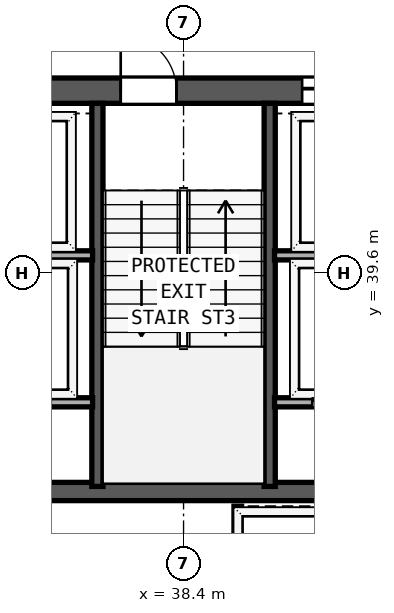
"""IFC4 building model, lengths in metres.
Left out: names, types, materials, properties, quantities, classifications, styles, units other than length and angle.
Written with IfcOpenShell. Run it as: python <this file> out.ifc"""

import sys

from ifc_helpers import new_model, si_unit, direction, frame, frame_2d, origin, place, context, subcontext, project, spatial, rectangle, extrude, element, fill, save


model = new_model("IFC4")
c1 = context("Model", 3, precision=1e-05, world=origin(), true_north=direction((0.0, 1.0)))
c2 = subcontext(c1, "Body", "Model", "MODEL_VIEW")
j1 = project(units=[si_unit("LENGTHUNIT", "METRE"), si_unit("PLANEANGLEUNIT", "RADIAN")], contexts=[c1])
p1 = place(None, origin())
s1 = spatial("IfcSite", under=j1, at=p1, CompositionType="ELEMENT")
p2 = place(p1, origin())
s2 = spatial("IfcBuilding", under=s1, at=p2, CompositionType="ELEMENT")
p3 = place(p2, frame((0.0, 0.0, 301.7)))
s3 = spatial("IfcBuildingStorey", under=s2, at=p3, CompositionType="ELEMENT", Elevation=301.7)
p4 = place(p3, frame((29.75, 43.2, 0.0), z_axis=(0.0, 0.0, 1.0), x_axis=(1.0, 0.0, 0.0)))
e1 = element("IfcWall", 1, at=p4, inside=s3, PredefinedType="SHEAR", context=c2, shape_type="SweptSolid", body=[
    extrude(rectangle(XDim=17.3, YDim=0.5, at=frame_2d((8.65, 0.0))), origin(), (0.0, 0.0, 1.0), 3.72),
])
p5 = place(p4, frame((2.3, 0.0, 0.0)))
e2 = element("IfcOpeningElement", 2, at=p5, cuts=e1, PredefinedType="OPENING", context=c2, shape_type="SweptSolid", body=[
    extrude(rectangle(XDim=1.1, YDim=2.15, at=frame_2d((0.55, 1.075))), frame((0.0, 0.26, 0.0), z_axis=(0.0, -1.0, 0.0), x_axis=(1.0, 0.0, 0.0)), (0.0, 0.0, 1.0), 0.52),
])
p6 = place(p4, frame((7.41, 0.0, 0.0)))
e3 = element("IfcOpeningElement", 3, at=p6, cuts=e1, PredefinedType="OPENING", context=c2, shape_type="SweptSolid", body=[
    extrude(rectangle(XDim=1.1, YDim=2.15, at=frame_2d((0.55, 1.075))), frame((0.0, 0.26, 0.0), z_axis=(0.0, -1.0, 0.0), x_axis=(1.0, 0.0, 0.0)), (0.0, 0.0, 1.0), 0.52),
])
p7 = place(p4, frame((13.5, 0.0, 0.0)))
e4 = element("IfcOpeningElement", 4, at=p7, cuts=e1, PredefinedType="OPENING", context=c2, shape_type="SweptSolid", body=[
    extrude(rectangle(XDim=1.1, YDim=2.15, at=frame_2d((0.55, 1.075))), frame((0.0, 0.26, 0.0), z_axis=(0.0, -1.0, 0.0), x_axis=(1.0, 0.0, 0.0)), (0.0, 0.0, 1.0), 0.52),
])
p8 = place(p4, frame((4.63, 0.0, 0.0)))
e5 = element("IfcOpeningElement", 5, at=p8, cuts=e1, PredefinedType="OPENING", context=c2, shape_type="SweptSolid", body=[
    extrude(rectangle(XDim=1.1, YDim=2.2, at=frame_2d((0.55, 1.1))), frame((0.0, 0.26, 0.0), z_axis=(0.0, -1.0, 0.0), x_axis=(1.0, 0.0, 0.0)), (0.0, 0.0, 1.0), 0.52),
])
p9 = place(p4, frame((10.99, 0.0, 0.0)))
e6 = element("IfcOpeningElement", 6, at=p9, cuts=e1, PredefinedType="OPENING", context=c2, shape_type="SweptSolid", body=[
    extrude(rectangle(XDim=1.1, YDim=2.2, at=frame_2d((0.55, 1.1))), frame((0.0, 0.26, 0.0), z_axis=(0.0, -1.0, 0.0), x_axis=(1.0, 0.0, 0.0)), (0.0, 0.0, 1.0), 0.52),
])
p10 = place(p3, frame((30.25, 35.29, 0.0), z_axis=(0.0, 0.0, 1.0), x_axis=(1.0, 0.0, 0.0)))
e7 = element("IfcWall", 7, at=p10, inside=s3, PredefinedType="SHEAR", context=c2, shape_type="SweptSolid", body=[
    extrude(rectangle(XDim=16.3, YDim=0.36, at=frame_2d((8.15, 0.0))), origin(), (0.0, 0.0, 1.0), 3.72),
])
p11 = place(p10, frame((5.1, 0.0, 0.0), z_axis=(0.0, 0.0, 1.0), x_axis=(-1.0, 0.0, 0.0)))
e8 = element("IfcOpeningElement", 8, at=p11, cuts=e7, PredefinedType="OPENING", context=c2, shape_type="SweptSolid", body=[
    extrude(rectangle(XDim=0.9, YDim=2.1, at=frame_2d((0.45, 1.05))), frame((0.0, 0.19, 0.0), z_axis=(0.0, -1.0, 0.0), x_axis=(1.0, 0.0, 0.0)), (0.0, 0.0, 1.0), 0.38),
])
p12 = place(p10, frame((12.16, 0.0, 0.0), z_axis=(0.0, 0.0, 1.0), x_axis=(-1.0, 0.0, 0.0)))
e9 = element("IfcOpeningElement", 9, at=p12, cuts=e7, PredefinedType="OPENING", context=c2, shape_type="SweptSolid", body=[
    extrude(rectangle(XDim=0.9, YDim=2.1, at=frame_2d((0.45, 1.05))), frame((0.0, 0.19, 0.0), z_axis=(0.0, -1.0, 0.0), x_axis=(1.0, 0.0, 0.0)), (0.0, 0.0, 1.0), 0.38),
])
for number, where, z_axis, x_axis in (
    (10, (36.7, 35.39, 0.0), (0.0, 0.0, 1.0), (0.0, 1.0, 0.0)),
    (11, (40.1, 35.39, 0.0), (0.0, 0.0, 1.0), (0.0, 1.0, 0.0)),
):
    element("IfcWall", number, at=place(p3, frame(where, z_axis=z_axis, x_axis=x_axis)), inside=s3, PredefinedType="SHEAR", context=c2, shape_type="SweptSolid", body=[
        extrude(rectangle(XDim=7.56, YDim=0.22, at=frame_2d((3.78, 0.0))), origin(), (0.0, 0.0, 1.0), 3.72),
    ])
for number, where, z_axis, x_axis in (
    (12, (33.835, 39.95, 0.0), (0.0, 0.0, 1.0), (1.0, 0.0, 0.0)),
    (13, (40.195, 39.95, 0.0), (0.0, 0.0, 1.0), (1.0, 0.0, 0.0)),
):
    element("IfcWall", number, at=place(p3, frame(where, z_axis=z_axis, x_axis=x_axis)), inside=s3, PredefinedType="SOLIDWALL", context=c2, shape_type="SweptSolid", body=[
        extrude(rectangle(XDim=2.77, YDim=0.18, at=frame_2d((1.385, 0.0))), origin(), (0.0, 0.0, 1.0), 3.72),
    ])
p13 = place(p3, frame((33.835, 37.05, 0.0), z_axis=(0.0, 0.0, 1.0), x_axis=(1.0, 0.0, 0.0)))
e14 = element("IfcWall", 14, at=p13, inside=s3, PredefinedType="SOLIDWALL", context=c2, shape_type="SweptSolid", body=[
    extrude(rectangle(XDim=2.77, YDim=0.18, at=frame_2d((1.385, 0.0))), origin(), (0.0, 0.0, 1.0), 3.72),
])
p14 = place(p13, frame((1.945, 0.0, 0.0), z_axis=(0.0, 0.0, 1.0), x_axis=(-1.0, 0.0, 0.0)))
e15 = element("IfcOpeningElement", 15, at=p14, cuts=e14, PredefinedType="OPENING", context=c2, shape_type="SweptSolid", body=[
    extrude(rectangle(XDim=1.2, YDim=2.2, at=frame_2d((0.6, 1.1))), frame((0.0, 0.1, 0.0), z_axis=(0.0, -1.0, 0.0), x_axis=(1.0, 0.0, 0.0)), (0.0, 0.0, 1.0), 0.2),
])
p15 = place(p3, frame((40.195, 37.05, 0.0), z_axis=(0.0, 0.0, 1.0), x_axis=(1.0, 0.0, 0.0)))
e16 = element("IfcWall", 16, at=p15, inside=s3, PredefinedType="SOLIDWALL", context=c2, shape_type="SweptSolid", body=[
    extrude(rectangle(XDim=2.77, YDim=0.18, at=frame_2d((1.385, 0.0))), origin(), (0.0, 0.0, 1.0), 3.72),
])
p16 = place(p15, frame((1.945, 0.0, 0.0), z_axis=(0.0, 0.0, 1.0), x_axis=(-1.0, 0.0, 0.0)))
e17 = element("IfcOpeningElement", 17, at=p16, cuts=e16, PredefinedType="OPENING", context=c2, shape_type="SweptSolid", body=[
    extrude(rectangle(XDim=1.2, YDim=2.2, at=frame_2d((0.6, 1.1))), frame((0.0, 0.1, 0.0), z_axis=(0.0, -1.0, 0.0), x_axis=(1.0, 0.0, 0.0)), (0.0, 0.0, 1.0), 0.2),
])
p17 = place(p3, frame((39.47, 32.95, 0.0), z_axis=(0.0, 0.0, 1.0), x_axis=(0.0, 1.0, 0.0)))
e18 = element("IfcWall", 18, at=p17, inside=s3, PredefinedType="SOLIDWALL", context=c2, shape_type="SweptSolid", body=[
    extrude(rectangle(XDim=2.05, YDim=0.15, at=frame_2d((1.025, 0.0))), origin(), (0.0, 0.0, 1.0), 3.72),
])
p18 = place(p6, origin())
e19 = element("IfcDoor", 19, at=p18, inside=s3, OperationType="SINGLE_SWING_LEFT", PredefinedType="DOOR", context=c2, shape_type="SweptSolid", body=[
    extrude(rectangle(XDim=1.1, YDim=2.15, at=frame_2d((0.55, 1.075))), frame((0.0, 0.185, 0.0), z_axis=(0.0, -1.0, 0.0), x_axis=(1.0, 0.0, 0.0)), (0.0, 0.0, 1.0), 0.05),
])
fill(e3, e19)
p19 = place(p9, origin())
e20 = element("IfcDoor", 20, at=p19, inside=s3, OperationType="SLIDING_TO_LEFT", PredefinedType="DOOR", context=c2, shape_type="SweptSolid", body=[
    extrude(rectangle(XDim=1.1, YDim=2.2, at=frame_2d((0.55, 1.1))), frame((0.0, 0.185, 0.0), z_axis=(0.0, -1.0, 0.0), x_axis=(1.0, 0.0, 0.0)), (0.0, 0.0, 1.0), 0.05),
])
fill(e6, e20)
p20 = place(p16, origin())
e21 = element("IfcDoor", 21, at=p20, inside=s3, OperationType="SLIDING_TO_RIGHT", PredefinedType="DOOR", context=c2, shape_type="SweptSolid", body=[
    extrude(rectangle(XDim=1.2, YDim=2.2, at=frame_2d((0.6, 1.1))), frame((0.0, 0.025, 0.0), z_axis=(0.0, -1.0, 0.0), x_axis=(1.0, 0.0, 0.0)), (0.0, 0.0, 1.0), 0.05),
])
fill(e17, e21)
save(model, sys.argv[1])
